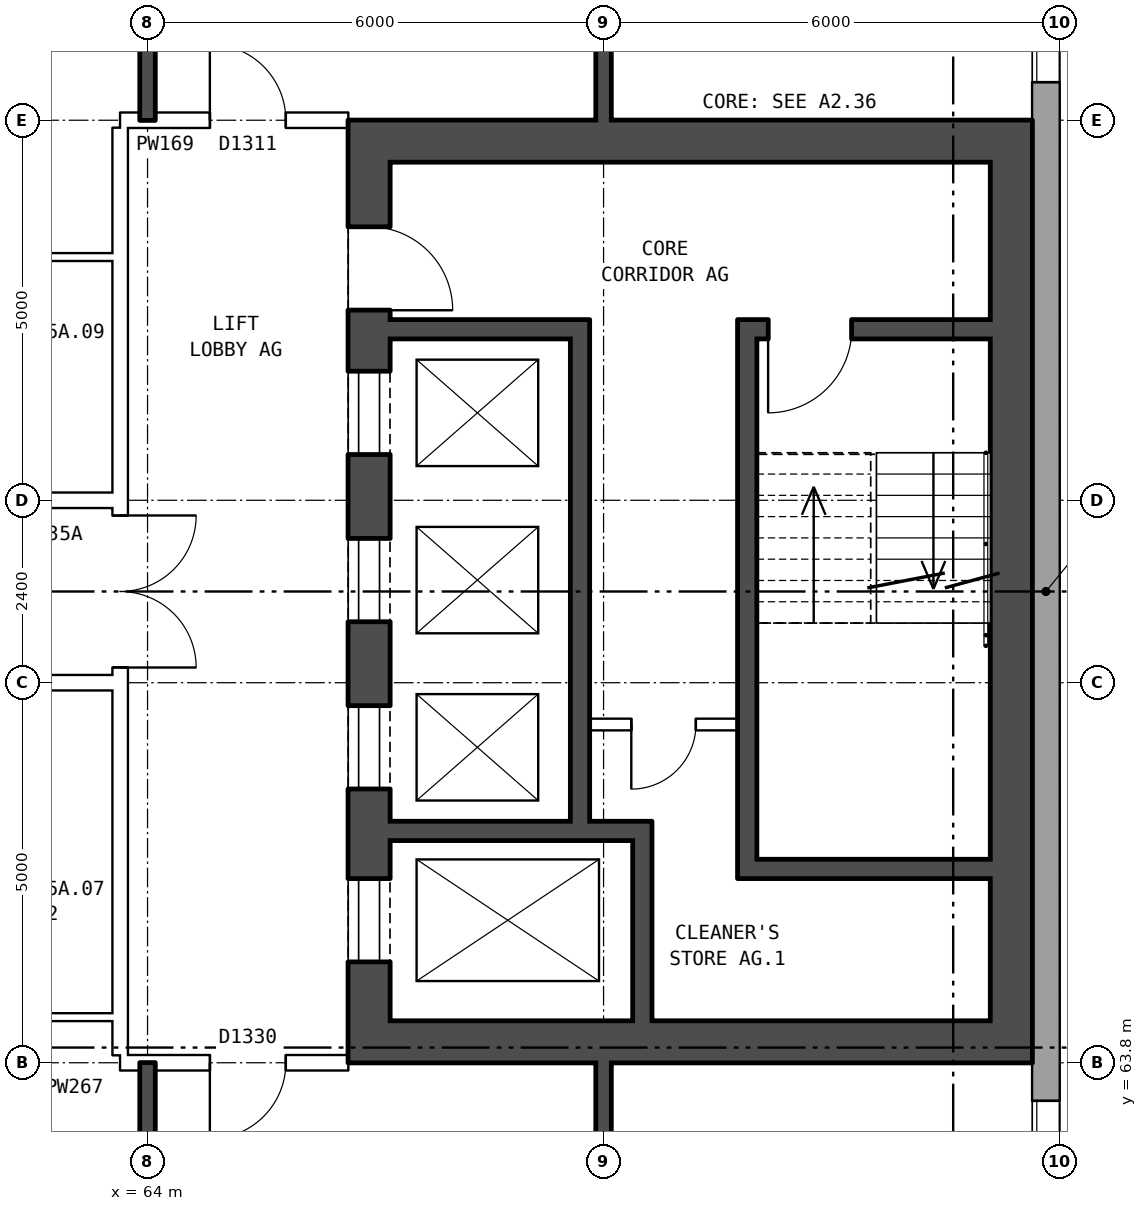
"""IFC4 building model, lengths in metres.
Left out: names, types, materials, properties, quantities, classifications, styles, units other than length and angle.
Written with IfcOpenShell. Run it as: python <this file> out.ifc"""

import sys

from ifc_helpers import new_model, si_unit, direction, frame, frame_2d, origin, place, context, subcontext, project, spatial, rectangle, extrude, element, fill, save


model = new_model("IFC4")
c1 = context("Model", 3, precision=1e-05, world=origin(), true_north=direction((0.0, 1.0)))
c2 = subcontext(c1, "Body", "Model", "MODEL_VIEW")
j1 = project(units=[si_unit("LENGTHUNIT", "METRE"), si_unit("PLANEANGLEUNIT", "RADIAN")], contexts=[c1])
p1 = place(None, origin())
s1 = spatial("IfcSite", under=j1, at=p1, CompositionType="ELEMENT")
p2 = place(p1, origin())
s2 = spatial("IfcBuilding", under=s1, at=p2, CompositionType="ELEMENT")
p3 = place(p2, frame((0.0, 0.0, 126.8)))
s3 = spatial("IfcBuildingStorey", under=s2, at=p3, CompositionType="ELEMENT", Elevation=126.8)
p4 = place(p3, frame((75.82, 57.075, 0.0), z_axis=(0.0, 0.0, 1.0), x_axis=(0.0, 1.0, 0.0)))
e1 = element("IfcWall", 1, at=p4, inside=s3, PredefinedType="STANDARD", context=c2, shape_type="SweptSolid", body=[
    extrude(rectangle(XDim=25.851, YDim=0.36, at=frame_2d((12.925, 0.0))), origin(), (0.0, 0.0, 1.0), 2.85),
])
p5 = place(p4, frame((1.625, 0.0, 0.8)))
e2 = element("IfcOpeningElement", 2, at=p5, cuts=e1, PredefinedType="OPENING", context=c2, shape_type="SweptSolid", body=[
    extrude(rectangle(XDim=1.6, YDim=1.8, at=frame_2d((0.8, 0.9))), frame((0.0, 0.19, 0.0), z_axis=(0.0, -1.0, 0.0), x_axis=(1.0, 0.0, 0.0)), (0.0, 0.0, 1.0), 0.38),
])
p6 = place(p4, frame((4.625, 0.0, 0.8)))
e3 = element("IfcOpeningElement", 3, at=p6, cuts=e1, PredefinedType="OPENING", context=c2, shape_type="SweptSolid", body=[
    extrude(rectangle(XDim=1.6, YDim=1.8, at=frame_2d((0.8, 0.9))), frame((0.0, 0.19, 0.0), z_axis=(0.0, -1.0, 0.0), x_axis=(1.0, 0.0, 0.0)), (0.0, 0.0, 1.0), 0.38),
])
p7 = place(p4, frame((19.625, 0.0, 0.8)))
e4 = element("IfcOpeningElement", 4, at=p7, cuts=e1, PredefinedType="OPENING", context=c2, shape_type="SweptSolid", body=[
    extrude(rectangle(XDim=1.6, YDim=1.8, at=frame_2d((0.8, 0.9))), frame((0.0, 0.19, 0.0), z_axis=(0.0, -1.0, 0.0), x_axis=(1.0, 0.0, 0.0)), (0.0, 0.0, 1.0), 0.38),
])
p8 = place(p4, frame((22.625, 0.0, 0.8)))
e5 = element("IfcOpeningElement", 5, at=p8, cuts=e1, PredefinedType="OPENING", context=c2, shape_type="SweptSolid", body=[
    extrude(rectangle(XDim=1.6, YDim=1.8, at=frame_2d((0.8, 0.9))), frame((0.0, 0.19, 0.0), z_axis=(0.0, -1.0, 0.0), x_axis=(1.0, 0.0, 0.0)), (0.0, 0.0, 1.0), 0.38),
])
p9 = place(p3, frame((66.915, 63.8, 0.0), z_axis=(0.0, 0.0, 1.0), x_axis=(0.0, 1.0, 0.0)))
e6 = element("IfcWall", 6, at=p9, inside=s3, PredefinedType="SHEAR", context=c2, shape_type="SweptSolid", body=[
    extrude(rectangle(XDim=12.4, YDim=0.55, at=frame_2d((6.2, 0.0))), origin(), (0.0, 0.0, 1.0), 2.85),
])
p10 = place(p9, frame((1.325, 0.0, 0.0)))
e7 = element("IfcOpeningElement", 7, at=p10, cuts=e6, PredefinedType="OPENING", context=c2, shape_type="SweptSolid", body=[
    extrude(rectangle(XDim=1.1, YDim=2.1, at=frame_2d((0.55, 1.05))), frame((0.0, 0.285, 0.0), z_axis=(0.0, -1.0, 0.0), x_axis=(1.0, 0.0, 0.0)), (0.0, 0.0, 1.0), 0.57),
])
p11 = place(p9, frame((3.6, 0.0, 0.0)))
e8 = element("IfcOpeningElement", 8, at=p11, cuts=e6, PredefinedType="OPENING", context=c2, shape_type="SweptSolid", body=[
    extrude(rectangle(XDim=1.1, YDim=2.1, at=frame_2d((0.55, 1.05))), frame((0.0, 0.285, 0.0), z_axis=(0.0, -1.0, 0.0), x_axis=(1.0, 0.0, 0.0)), (0.0, 0.0, 1.0), 0.57),
])
p12 = place(p9, frame((5.8, 0.0, 0.0)))
e9 = element("IfcOpeningElement", 9, at=p12, cuts=e6, PredefinedType="OPENING", context=c2, shape_type="SweptSolid", body=[
    extrude(rectangle(XDim=1.1, YDim=2.1, at=frame_2d((0.55, 1.05))), frame((0.0, 0.285, 0.0), z_axis=(0.0, -1.0, 0.0), x_axis=(1.0, 0.0, 0.0)), (0.0, 0.0, 1.0), 0.57),
])
p13 = place(p9, frame((8.0, 0.0, 0.0)))
e10 = element("IfcOpeningElement", 10, at=p13, cuts=e6, PredefinedType="OPENING", context=c2, shape_type="SweptSolid", body=[
    extrude(rectangle(XDim=1.1, YDim=2.1, at=frame_2d((0.55, 1.05))), frame((0.0, 0.285, 0.0), z_axis=(0.0, -1.0, 0.0), x_axis=(1.0, 0.0, 0.0)), (0.0, 0.0, 1.0), 0.57),
])
p14 = place(p9, frame((9.9, 0.0, 0.0)))
e11 = element("IfcOpeningElement", 11, at=p14, cuts=e6, PredefinedType="OPENING", context=c2, shape_type="SweptSolid", body=[
    extrude(rectangle(XDim=1.1, YDim=2.1, at=frame_2d((0.55, 1.05))), frame((0.0, 0.285, 0.0), z_axis=(0.0, -1.0, 0.0), x_axis=(1.0, 0.0, 0.0)), (0.0, 0.0, 1.0), 0.57),
])
p15 = place(p3, frame((75.365, 63.8, 0.0), z_axis=(0.0, 0.0, 1.0), x_axis=(0.0, 1.0, 0.0)))
e12 = element("IfcWall", 12, at=p15, inside=s3, PredefinedType="SHEAR", context=c2, shape_type="SweptSolid", body=[
    extrude(rectangle(XDim=12.4, YDim=0.55, at=frame_2d((6.2, 0.0))), origin(), (0.0, 0.0, 1.0), 2.85),
])
for number, where, z_axis, x_axis in (
    (13, (67.19, 64.075, 0.0), (0.0, 0.0, 1.0), (1.0, 0.0, 0.0)),
    (14, (67.19, 75.925, 0.0), (0.0, 0.0, 1.0), (1.0, 0.0, 0.0)),
):
    element("IfcWall", number, at=place(p3, frame(where, z_axis=z_axis, x_axis=x_axis)), inside=s3, PredefinedType="SHEAR", context=c2, shape_type="SweptSolid", body=[
        extrude(rectangle(XDim=7.9, YDim=0.55, at=frame_2d((3.95, 0.0))), origin(), (0.0, 0.0, 1.0), 2.85),
    ])
p16 = place(p3, frame((72.015, 66.35, 0.0), z_axis=(0.0, 0.0, 1.0), x_axis=(1.0, 0.0, 0.0)))
e15 = element("IfcWall", 15, at=p16, inside=s3, PredefinedType="SHEAR", context=c2, shape_type="SweptSolid", body=[
    extrude(rectangle(XDim=3.075, YDim=0.25, at=frame_2d((1.538, 0.0))), origin(), (0.0, 0.0, 1.0), 2.85),
])
p17 = place(p3, frame((67.19, 66.85, 0.0), z_axis=(0.0, 0.0, 1.0), x_axis=(1.0, 0.0, 0.0)))
e16 = element("IfcWall", 16, at=p17, inside=s3, PredefinedType="SHEAR", context=c2, shape_type="SweptSolid", body=[
    extrude(rectangle(XDim=3.445, YDim=0.25, at=frame_2d((1.723, 0.0))), origin(), (0.0, 0.0, 1.0), 2.85),
])
p18 = place(p3, frame((69.815, 68.25, 0.0), z_axis=(0.0, 0.0, 1.0), x_axis=(1.0, 0.0, 0.0)))
e17 = element("IfcWall", 17, at=p18, inside=s3, PredefinedType="PARTITIONING", context=c2, shape_type="SweptSolid", body=[
    extrude(rectangle(XDim=1.95, YDim=0.15, at=frame_2d((0.975, 0.0))), origin(), (0.0, 0.0, 1.0), 2.85),
])
p19 = place(p18, frame((0.55, 0.0, 0.0)))
e18 = element("IfcOpeningElement", 18, at=p19, cuts=e17, PredefinedType="OPENING", context=c2, shape_type="SweptSolid", body=[
    extrude(rectangle(XDim=0.85, YDim=2.1, at=frame_2d((0.425, 1.05))), frame((0.0, 0.085, 0.0), z_axis=(0.0, -1.0, 0.0), x_axis=(1.0, 0.0, 0.0)), (0.0, 0.0, 1.0), 0.17),
])
p20 = place(p3, frame((67.19, 73.45, 0.0), z_axis=(0.0, 0.0, 1.0), x_axis=(1.0, 0.0, 0.0)))
e19 = element("IfcWall", 19, at=p20, inside=s3, PredefinedType="SHEAR", context=c2, shape_type="SweptSolid", body=[
    extrude(rectangle(XDim=2.375, YDim=0.25, at=frame_2d((1.188, 0.0))), origin(), (0.0, 0.0, 1.0), 2.85),
])
p21 = place(p3, frame((72.015, 73.45, 0.0), z_axis=(0.0, 0.0, 1.0), x_axis=(1.0, 0.0, 0.0)))
e20 = element("IfcWall", 20, at=p21, inside=s3, PredefinedType="SHEAR", context=c2, shape_type="SweptSolid", body=[
    extrude(rectangle(XDim=3.075, YDim=0.25, at=frame_2d((1.538, 0.0))), origin(), (0.0, 0.0, 1.0), 2.85),
])
p22 = place(p21, frame((0.15, 0.0, 0.0)))
e21 = element("IfcOpeningElement", 21, at=p22, cuts=e20, PredefinedType="OPENING", context=c2, shape_type="SweptSolid", body=[
    extrude(rectangle(XDim=1.1, YDim=2.1, at=frame_2d((0.55, 1.05))), frame((0.0, 0.135, 0.0), z_axis=(0.0, -1.0, 0.0), x_axis=(1.0, 0.0, 0.0)), (0.0, 0.0, 1.0), 0.27),
])
p23 = place(p3, frame((69.69, 66.975, 0.0), z_axis=(0.0, 0.0, 1.0), x_axis=(0.0, 1.0, 0.0)))
e22 = element("IfcWall", 22, at=p23, inside=s3, PredefinedType="SHEAR", context=c2, shape_type="SweptSolid", body=[
    extrude(rectangle(XDim=6.6, YDim=0.25, at=frame_2d((3.3, 0.0))), origin(), (0.0, 0.0, 1.0), 2.85),
])
p24 = place(p3, frame((70.51, 64.35, 0.0), z_axis=(0.0, 0.0, 1.0), x_axis=(0.0, 1.0, 0.0)))
e23 = element("IfcWall", 23, at=p24, inside=s3, PredefinedType="SHEAR", context=c2, shape_type="SweptSolid", body=[
    extrude(rectangle(XDim=2.375, YDim=0.25, at=frame_2d((1.188, 0.0))), origin(), (0.0, 0.0, 1.0), 2.85),
])
p25 = place(p3, frame((71.89, 66.225, 0.0), z_axis=(0.0, 0.0, 1.0), x_axis=(0.0, 1.0, 0.0)))
e24 = element("IfcWall", 24, at=p25, inside=s3, PredefinedType="SHEAR", context=c2, shape_type="SweptSolid", body=[
    extrude(rectangle(XDim=7.35, YDim=0.25, at=frame_2d((3.675, 0.0))), origin(), (0.0, 0.0, 1.0), 2.85),
])
p26 = place(p3, frame((63.64, 63.9, 0.0), z_axis=(0.0, 0.0, 1.0), x_axis=(0.0, 1.0, 0.0)))
e25 = element("IfcWall", 25, at=p26, inside=s3, PredefinedType="PARTITIONING", context=c2, shape_type="SweptSolid", body=[
    extrude(rectangle(XDim=12.2, YDim=0.2, at=frame_2d((6.1, 0.0))), origin(), (0.0, 0.0, 1.0), 2.85),
])
p27 = place(p26, frame((5.1, 0.0, 0.0)))
e26 = element("IfcOpeningElement", 26, at=p27, cuts=e25, PredefinedType="OPENING", context=c2, shape_type="SweptSolid", body=[
    extrude(rectangle(XDim=2.0, YDim=2.1, at=frame_2d((1.0, 1.05))), frame((0.0, 0.11, 0.0), z_axis=(0.0, -1.0, 0.0), x_axis=(1.0, 0.0, 0.0)), (0.0, 0.0, 1.0), 0.22),
])
p28 = place(p3, frame((63.64, 63.8, 0.0), z_axis=(0.0, 0.0, 1.0), x_axis=(1.0, 0.0, 0.0)))
e27 = element("IfcWall", 27, at=p28, inside=s3, PredefinedType="PARTITIONING", context=c2, shape_type="SweptSolid", body=[
    extrude(rectangle(XDim=3.0, YDim=0.2, at=frame_2d((1.5, 0.0))), origin(), (0.0, 0.0, 1.0), 2.85),
])
p29 = place(p28, frame((1.18, 0.0, 0.0)))
e28 = element("IfcOpeningElement", 28, at=p29, cuts=e27, PredefinedType="OPENING", context=c2, shape_type="SweptSolid", body=[
    extrude(rectangle(XDim=1.0, YDim=2.1, at=frame_2d((0.5, 1.05))), frame((0.0, 0.11, 0.0), z_axis=(0.0, -1.0, 0.0), x_axis=(1.0, 0.0, 0.0)), (0.0, 0.0, 1.0), 0.22),
])
p30 = place(p3, frame((61.0, 64.4, 0.0), z_axis=(0.0, 0.0, 1.0), x_axis=(1.0, 0.0, 0.0)))
e29 = element("IfcWall", 29, at=p30, inside=s3, PredefinedType="PARTITIONING", context=c2, shape_type="SweptSolid", body=[
    extrude(rectangle(XDim=2.64, YDim=0.1, at=frame_2d((1.32, 0.0))), origin(), (0.0, 0.0, 1.0), 2.85),
])
p31 = place(p3, frame((44.36, 68.8, 0.0), z_axis=(0.0, 0.0, 1.0), x_axis=(1.0, 0.0, 0.0)))
e30 = element("IfcWall", 30, at=p31, inside=s3, PredefinedType="PARTITIONING", context=c2, shape_type="SweptSolid", body=[
    extrude(rectangle(XDim=19.28, YDim=0.2, at=frame_2d((9.64, 0.0))), origin(), (0.0, 0.0, 1.0), 2.85),
])
p32 = place(p31, frame((14.64, 0.0, 0.0)))
e31 = element("IfcOpeningElement", 31, at=p32, cuts=e30, PredefinedType="OPENING", context=c2, shape_type="SweptSolid", body=[
    extrude(rectangle(XDim=1.0, YDim=2.1, at=frame_2d((0.5, 1.05))), frame((0.0, 0.11, 0.0), z_axis=(0.0, -1.0, 0.0), x_axis=(1.0, 0.0, 0.0)), (0.0, 0.0, 1.0), 0.22),
])
p33 = place(p31, frame((5.64, 0.0, 0.0)))
e32 = element("IfcOpeningElement", 32, at=p33, cuts=e30, PredefinedType="OPENING", context=c2, shape_type="SweptSolid", body=[
    extrude(rectangle(XDim=1.0, YDim=2.1, at=frame_2d((0.5, 1.05))), frame((0.0, 0.11, 0.0), z_axis=(0.0, -1.0, 0.0), x_axis=(1.0, 0.0, 0.0)), (0.0, 0.0, 1.0), 0.22),
])
p34 = place(p3, frame((44.36, 71.2, 0.0), z_axis=(0.0, 0.0, 1.0), x_axis=(1.0, 0.0, 0.0)))
e33 = element("IfcWall", 33, at=p34, inside=s3, PredefinedType="PARTITIONING", context=c2, shape_type="SweptSolid", body=[
    extrude(rectangle(XDim=19.28, YDim=0.2, at=frame_2d((9.64, 0.0))), origin(), (0.0, 0.0, 1.0), 2.85),
])
p35 = place(p34, frame((14.64, 0.0, 0.0)))
e34 = element("IfcOpeningElement", 34, at=p35, cuts=e33, PredefinedType="OPENING", context=c2, shape_type="SweptSolid", body=[
    extrude(rectangle(XDim=1.0, YDim=2.1, at=frame_2d((0.5, 1.05))), frame((0.0, 0.11, 0.0), z_axis=(0.0, -1.0, 0.0), x_axis=(1.0, 0.0, 0.0)), (0.0, 0.0, 1.0), 0.22),
])
p36 = place(p34, frame((5.64, 0.0, 0.0)))
e35 = element("IfcOpeningElement", 35, at=p36, cuts=e33, PredefinedType="OPENING", context=c2, shape_type="SweptSolid", body=[
    extrude(rectangle(XDim=1.0, YDim=2.1, at=frame_2d((0.5, 1.05))), frame((0.0, 0.11, 0.0), z_axis=(0.0, -1.0, 0.0), x_axis=(1.0, 0.0, 0.0)), (0.0, 0.0, 1.0), 0.22),
])
p37 = place(p3, frame((61.0, 74.4, 0.0), z_axis=(0.0, 0.0, 1.0), x_axis=(1.0, 0.0, 0.0)))
e36 = element("IfcWall", 36, at=p37, inside=s3, PredefinedType="PARTITIONING", context=c2, shape_type="SweptSolid", body=[
    extrude(rectangle(XDim=2.64, YDim=0.1, at=frame_2d((1.32, 0.0))), origin(), (0.0, 0.0, 1.0), 2.85),
])
p38 = place(p3, frame((63.64, 76.2, 0.0), z_axis=(0.0, 0.0, 1.0), x_axis=(1.0, 0.0, 0.0)))
e37 = element("IfcWall", 37, at=p38, inside=s3, PredefinedType="PARTITIONING", context=c2, shape_type="SweptSolid", body=[
    extrude(rectangle(XDim=3.0, YDim=0.2, at=frame_2d((1.5, 0.0))), origin(), (0.0, 0.0, 1.0), 2.85),
])
p39 = place(p38, frame((1.18, 0.0, 0.0)))
e38 = element("IfcOpeningElement", 38, at=p39, cuts=e37, PredefinedType="OPENING", context=c2, shape_type="SweptSolid", body=[
    extrude(rectangle(XDim=1.0, YDim=2.1, at=frame_2d((0.5, 1.05))), frame((0.0, 0.11, 0.0), z_axis=(0.0, -1.0, 0.0), x_axis=(1.0, 0.0, 0.0)), (0.0, 0.0, 1.0), 0.22),
])
for number, where, z_axis, x_axis in (
    (39, (64.0, 54.36, 0.0), (0.0, 0.0, 1.0), (0.0, 1.0, 0.0)),
    (40, (64.0, 76.2, 0.0), (0.0, 0.0, 1.0), (0.0, 1.0, 0.0)),
):
    element("IfcWall", number, at=place(p3, frame(where, z_axis=z_axis, x_axis=x_axis)), inside=s3, PredefinedType="SOLIDWALL", context=c2, shape_type="SweptSolid", body=[
        extrude(rectangle(XDim=9.44, YDim=0.2, at=frame_2d((4.72, 0.0))), origin(), (0.0, 0.0, 1.0), 2.85),
    ])
p40 = place(p3, frame((70.0, 54.36, 0.0), z_axis=(0.0, 0.0, 1.0), x_axis=(0.0, 1.0, 0.0)))
e41 = element("IfcWall", 41, at=p40, inside=s3, PredefinedType="SOLIDWALL", context=c2, shape_type="SweptSolid", body=[
    extrude(rectangle(XDim=9.44, YDim=0.2, at=frame_2d((4.72, 0.0))), origin(), (0.0, 0.0, 1.0), 2.85),
])
p41 = place(p40, frame((1.37, 0.0, 0.0)))
e42 = element("IfcOpeningElement", 42, at=p41, cuts=e41, PredefinedType="OPENING", context=c2, shape_type="SweptSolid", body=[
    extrude(rectangle(XDim=0.9, YDim=2.1, at=frame_2d((0.45, 1.05))), frame((0.0, 0.11, 0.0), z_axis=(0.0, -1.0, 0.0), x_axis=(1.0, 0.0, 0.0)), (0.0, 0.0, 1.0), 0.22),
])
p42 = place(p40, frame((7.34, 0.0, 0.0)))
e43 = element("IfcOpeningElement", 43, at=p42, cuts=e41, PredefinedType="OPENING", context=c2, shape_type="SweptSolid", body=[
    extrude(rectangle(XDim=0.9, YDim=2.1, at=frame_2d((0.45, 1.05))), frame((0.0, 0.11, 0.0), z_axis=(0.0, -1.0, 0.0), x_axis=(1.0, 0.0, 0.0)), (0.0, 0.0, 1.0), 0.22),
])
p43 = place(p3, frame((70.0, 76.2, 0.0), z_axis=(0.0, 0.0, 1.0), x_axis=(0.0, 1.0, 0.0)))
e44 = element("IfcWall", 44, at=p43, inside=s3, PredefinedType="SOLIDWALL", context=c2, shape_type="SweptSolid", body=[
    extrude(rectangle(XDim=9.44, YDim=0.2, at=frame_2d((4.72, 0.0))), origin(), (0.0, 0.0, 1.0), 2.85),
])
p44 = place(p43, frame((1.5, 0.0, 0.0)))
e45 = element("IfcOpeningElement", 45, at=p44, cuts=e44, PredefinedType="OPENING", context=c2, shape_type="SweptSolid", body=[
    extrude(rectangle(XDim=0.9, YDim=2.1, at=frame_2d((0.45, 1.05))), frame((0.0, 0.11, 0.0), z_axis=(0.0, -1.0, 0.0), x_axis=(1.0, 0.0, 0.0)), (0.0, 0.0, 1.0), 0.22),
])
p45 = place(p6, origin())
e46 = element("IfcWindow", 46, at=p45, inside=s3, PartitioningType="SINGLE_PANEL", PredefinedType="WINDOW", context=c2, shape_type="SweptSolid", body=[
    extrude(rectangle(XDim=1.6, YDim=1.8, at=frame_2d((0.8, 0.9))), frame((0.0, 0.15, 0.0), z_axis=(0.0, -1.0, 0.0), x_axis=(1.0, 0.0, 0.0)), (0.0, 0.0, 1.0), 0.06),
])
fill(e3, e46)
p46 = place(p7, origin())
e47 = element("IfcWindow", 47, at=p46, inside=s3, PartitioningType="SINGLE_PANEL", PredefinedType="WINDOW", context=c2, shape_type="SweptSolid", body=[
    extrude(rectangle(XDim=1.6, YDim=1.8, at=frame_2d((0.8, 0.9))), frame((0.0, 0.15, 0.0), z_axis=(0.0, -1.0, 0.0), x_axis=(1.0, 0.0, 0.0)), (0.0, 0.0, 1.0), 0.06),
])
fill(e4, e47)
p47 = place(p10, origin())
e48 = element("IfcDoor", 48, at=p47, inside=s3, OperationType="DOUBLE_DOOR_SLIDING", PredefinedType="DOOR", context=c2, shape_type="SweptSolid", body=[
    extrude(rectangle(XDim=1.1, YDim=2.1, at=frame_2d((0.55, 1.05))), frame((0.0, -0.21, 0.0), z_axis=(0.0, -1.0, 0.0), x_axis=(1.0, 0.0, 0.0)), (0.0, 0.0, 1.0), 0.05),
])
fill(e7, e48)
p48 = place(p11, origin())
e49 = element("IfcDoor", 49, at=p48, inside=s3, OperationType="DOUBLE_DOOR_SLIDING", PredefinedType="DOOR", context=c2, shape_type="SweptSolid", body=[
    extrude(rectangle(XDim=1.1, YDim=2.1, at=frame_2d((0.55, 1.05))), frame((0.0, -0.21, 0.0), z_axis=(0.0, -1.0, 0.0), x_axis=(1.0, 0.0, 0.0)), (0.0, 0.0, 1.0), 0.05),
])
fill(e8, e49)
p49 = place(p12, origin())
e50 = element("IfcDoor", 50, at=p49, inside=s3, OperationType="DOUBLE_DOOR_SLIDING", PredefinedType="DOOR", context=c2, shape_type="SweptSolid", body=[
    extrude(rectangle(XDim=1.1, YDim=2.1, at=frame_2d((0.55, 1.05))), frame((0.0, -0.21, 0.0), z_axis=(0.0, -1.0, 0.0), x_axis=(1.0, 0.0, 0.0)), (0.0, 0.0, 1.0), 0.05),
])
fill(e9, e50)
p50 = place(p13, origin())
e51 = element("IfcDoor", 51, at=p50, inside=s3, OperationType="DOUBLE_DOOR_SLIDING", PredefinedType="DOOR", context=c2, shape_type="SweptSolid", body=[
    extrude(rectangle(XDim=1.1, YDim=2.1, at=frame_2d((0.55, 1.05))), frame((0.0, -0.21, 0.0), z_axis=(0.0, -1.0, 0.0), x_axis=(1.0, 0.0, 0.0)), (0.0, 0.0, 1.0), 0.05),
])
fill(e10, e51)
p51 = place(p14, frame((1.1, 0.0, 0.0), z_axis=(0.0, 0.0, 1.0), x_axis=(-1.0, 0.0, 0.0)))
e52 = element("IfcDoor", 52, at=p51, inside=s3, OperationType="SINGLE_SWING_RIGHT", PredefinedType="DOOR", context=c2, shape_type="SweptSolid", body=[
    extrude(rectangle(XDim=1.1, YDim=2.1, at=frame_2d((0.55, 1.05))), frame((0.0, 0.26, 0.0), z_axis=(0.0, -1.0, 0.0), x_axis=(1.0, 0.0, 0.0)), (0.0, 0.0, 1.0), 0.05),
])
fill(e11, e52)
p52 = place(p22, frame((1.1, 0.0, 0.0), z_axis=(0.0, 0.0, 1.0), x_axis=(-1.0, 0.0, 0.0)))
e53 = element("IfcDoor", 53, at=p52, inside=s3, OperationType="SINGLE_SWING_RIGHT", PredefinedType="DOOR", context=c2, shape_type="SweptSolid", body=[
    extrude(rectangle(XDim=1.1, YDim=2.1, at=frame_2d((0.55, 1.05))), frame((0.0, 0.025, 0.0), z_axis=(0.0, -1.0, 0.0), x_axis=(1.0, 0.0, 0.0)), (0.0, 0.0, 1.0), 0.05),
])
fill(e21, e53)
p53 = place(p19, frame((0.85, 0.0, 0.0), z_axis=(0.0, 0.0, 1.0), x_axis=(-1.0, 0.0, 0.0)))
e54 = element("IfcDoor", 54, at=p53, inside=s3, OperationType="SINGLE_SWING_RIGHT", PredefinedType="DOOR", context=c2, shape_type="SweptSolid", body=[
    extrude(rectangle(XDim=0.85, YDim=2.1, at=frame_2d((0.425, 1.05))), frame((0.0, 0.025, 0.0), z_axis=(0.0, -1.0, 0.0), x_axis=(1.0, 0.0, 0.0)), (0.0, 0.0, 1.0), 0.05),
])
fill(e18, e54)
p54 = place(p27, frame((2.0, 0.0, 0.0), z_axis=(0.0, 0.0, 1.0), x_axis=(-1.0, 0.0, 0.0)))
e55 = element("IfcDoor", 55, at=p54, inside=s3, OperationType="DOUBLE_DOOR_SINGLE_SWING", PredefinedType="DOOR", context=c2, shape_type="SweptSolid", body=[
    extrude(rectangle(XDim=2.0, YDim=2.1, at=frame_2d((1.0, 1.05))), frame((0.0, 0.025, 0.0), z_axis=(0.0, -1.0, 0.0), x_axis=(1.0, 0.0, 0.0)), (0.0, 0.0, 1.0), 0.05),
])
fill(e26, e55)
p55 = place(p29, frame((1.0, 0.0, 0.0), z_axis=(0.0, 0.0, 1.0), x_axis=(-1.0, 0.0, 0.0)))
e56 = element("IfcDoor", 56, at=p55, inside=s3, OperationType="SINGLE_SWING_RIGHT", PredefinedType="DOOR", context=c2, shape_type="SweptSolid", body=[
    extrude(rectangle(XDim=1.0, YDim=2.1, at=frame_2d((0.5, 1.05))), frame((0.0, 0.025, 0.0), z_axis=(0.0, -1.0, 0.0), x_axis=(1.0, 0.0, 0.0)), (0.0, 0.0, 1.0), 0.05),
])
fill(e28, e56)
p56 = place(p39, origin())
e57 = element("IfcDoor", 57, at=p56, inside=s3, OperationType="SINGLE_SWING_LEFT", PredefinedType="DOOR", context=c2, shape_type="SweptSolid", body=[
    extrude(rectangle(XDim=1.0, YDim=2.1, at=frame_2d((0.5, 1.05))), frame((0.0, 0.025, 0.0), z_axis=(0.0, -1.0, 0.0), x_axis=(1.0, 0.0, 0.0)), (0.0, 0.0, 1.0), 0.05),
])
fill(e38, e57)
save(model, sys.argv[1])
